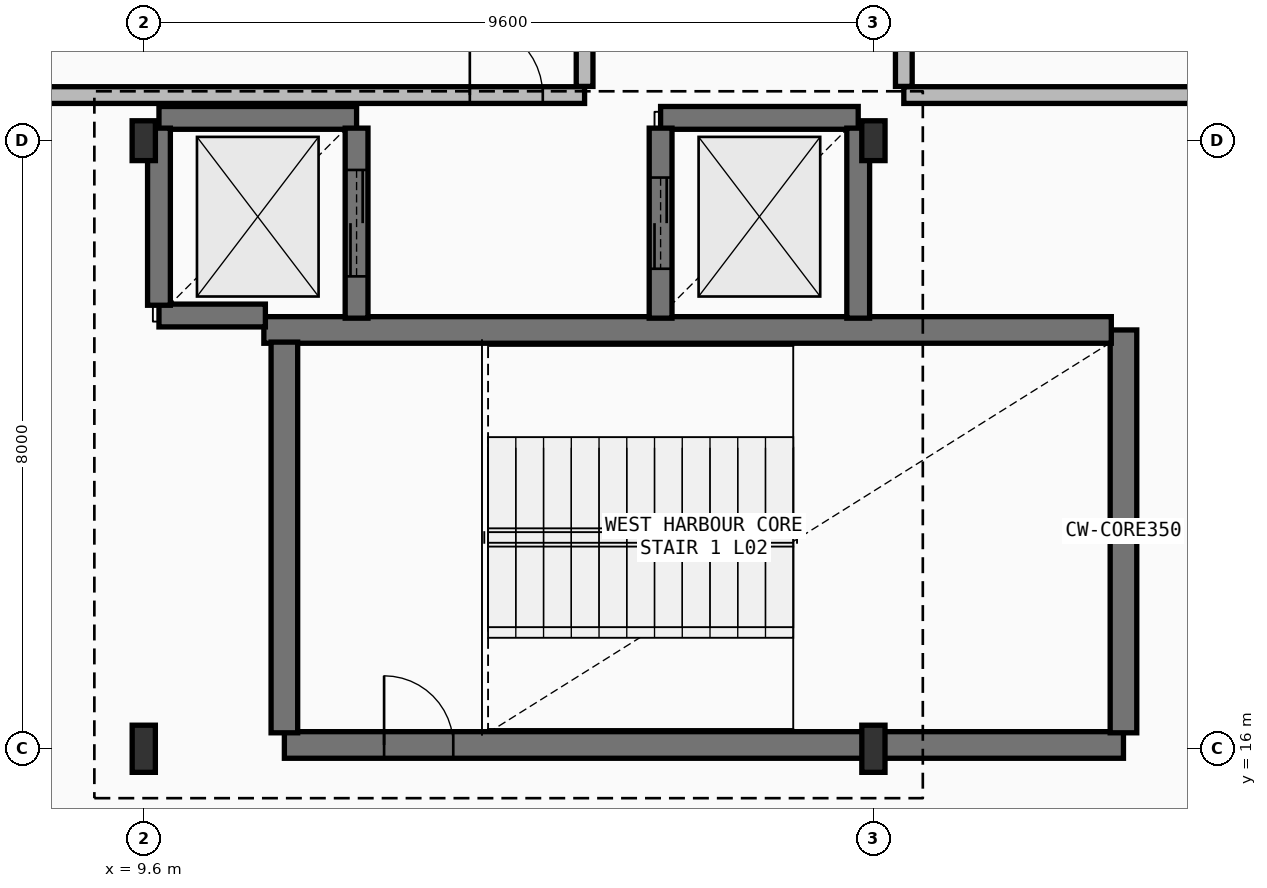
"""IFC4 building model, lengths in metres.
Left out: names, types, materials, properties, quantities, classifications, styles, units other than length and angle.
Written with IfcOpenShell. Run it as: python <this file> out.ifc"""

import sys

from ifc_helpers import new_model, si_unit, direction, frame, frame_2d, origin, origin_2d, place, context, subcontext, project, spatial, rectangle, i_section, extrude, element, fill, save


model = new_model("IFC4")
c1 = context("Model", 3, precision=1e-05, world=origin(), true_north=direction((0.0, 1.0)))
c2 = subcontext(c1, "Body", "Model", "MODEL_VIEW")
j1 = project(units=[si_unit("LENGTHUNIT", "METRE"), si_unit("PLANEANGLEUNIT", "RADIAN")], contexts=[c1])
p1 = place(None, origin())
s1 = spatial("IfcSite", under=j1, at=p1, CompositionType="ELEMENT")
p2 = place(p1, origin())
s2 = spatial("IfcBuilding", under=s1, at=p2, CompositionType="ELEMENT")
p3 = place(p2, frame((0.0, 0.0, 11.4)))
s3 = spatial("IfcBuildingStorey", under=s2, at=p3, CompositionType="ELEMENT", Elevation=11.4)
p4 = place(p3, frame((9.6, 16.0, 0.0), z_axis=(0.0, 0.0, 1.0), x_axis=(1.0, 0.0, 0.0)))
e1 = element("IfcColumn", 1, at=p4, inside=s3, PredefinedType="COLUMN", context=c2, shape_type="SweptSolid", body=[
    extrude(i_section(OverallWidth=0.305, OverallDepth=0.62, WebThickness=0.021, FlangeThickness=0.04, FilletRadius=0.027, at=origin_2d()), origin(), (0.0, 0.0, 1.0), 4.5),
])
p5 = place(p3, frame((9.6, 24.0, 0.0), z_axis=(0.0, 0.0, 1.0), x_axis=(1.0, 0.0, 0.0)))
e2 = element("IfcColumn", 2, at=p5, inside=s3, PredefinedType="COLUMN", context=c2, shape_type="SweptSolid", body=[
    extrude(i_section(OverallWidth=0.306, OverallDepth=0.524, WebThickness=0.021, FlangeThickness=0.04, FilletRadius=0.027, at=origin_2d()), origin(), (0.0, 0.0, 1.0), 4.5),
])
p6 = place(p3, frame((19.2, 16.0, 0.0), z_axis=(0.0, 0.0, 1.0), x_axis=(1.0, 0.0, 0.0)))
e3 = element("IfcColumn", 3, at=p6, inside=s3, PredefinedType="COLUMN", context=c2, shape_type="SweptSolid", body=[
    extrude(i_section(OverallWidth=0.305, OverallDepth=0.62, WebThickness=0.021, FlangeThickness=0.04, FilletRadius=0.027, at=origin_2d()), origin(), (0.0, 0.0, 1.0), 4.5),
])
p7 = place(p3, frame((19.2, 24.0, 0.0), z_axis=(0.0, 0.0, 1.0), x_axis=(1.0, 0.0, 0.0)))
e4 = element("IfcColumn", 4, at=p7, inside=s3, PredefinedType="COLUMN", context=c2, shape_type="SweptSolid", body=[
    extrude(i_section(OverallWidth=0.306, OverallDepth=0.524, WebThickness=0.021, FlangeThickness=0.04, FilletRadius=0.027, at=origin_2d()), origin(), (0.0, 0.0, 1.0), 4.5),
])
p8 = place(p3, frame((11.45, 16.05, 0.0), z_axis=(0.0, 0.0, 1.0), x_axis=(1.0, 0.0, 0.0)))
e5 = element("IfcWall", 5, at=p8, inside=s3, PredefinedType="SHEAR", context=c2, shape_type="SweptSolid", body=[
    extrude(rectangle(XDim=11.04, YDim=0.35, at=frame_2d((5.52, 0.0))), origin(), (0.0, 0.0, 1.0), 4.27),
])
p9 = place(p8, frame((1.312, 0.0, 0.0)))
e6 = element("IfcOpeningElement", 6, at=p9, cuts=e5, PredefinedType="OPENING", context=c2, shape_type="SweptSolid", body=[
    extrude(rectangle(XDim=0.91, YDim=2.08, at=frame_2d((0.455, 1.04))), frame((0.0, 0.185, 0.0), z_axis=(0.0, -1.0, 0.0), x_axis=(1.0, 0.0, 0.0)), (0.0, 0.0, 1.0), 0.37),
])
p10 = place(p3, frame((22.49, 16.21, 0.0), z_axis=(0.0, 0.0, 1.0), x_axis=(0.0, 1.0, 0.0)))
e7 = element("IfcWall", 7, at=p10, inside=s3, PredefinedType="SHEAR", context=c2, shape_type="SweptSolid", body=[
    extrude(rectangle(XDim=5.3, YDim=0.35, at=frame_2d((2.65, 0.0))), origin(), (0.0, 0.0, 1.0), 4.27),
])
p11 = place(p3, frame((22.33, 21.51, 0.0), z_axis=(0.0, 0.0, 1.0), x_axis=(-1.0, 0.0, 0.0)))
e8 = element("IfcWall", 8, at=p11, inside=s3, PredefinedType="SHEAR", context=c2, shape_type="SweptSolid", body=[
    extrude(rectangle(XDim=11.15, YDim=0.35, at=frame_2d((5.575, 0.0))), origin(), (0.0, 0.0, 1.0), 4.27),
])
p12 = place(p3, frame((11.45, 21.35, 0.0), z_axis=(0.0, 0.0, 1.0), x_axis=(0.0, -1.0, 0.0)))
e9 = element("IfcWall", 9, at=p12, inside=s3, PredefinedType="SHEAR", context=c2, shape_type="SweptSolid", body=[
    extrude(rectangle(XDim=5.14, YDim=0.35, at=frame_2d((2.57, 0.0))), origin(), (0.0, 0.0, 1.0), 4.27),
])
p13 = place(p3, frame((12.4, 24.3, 0.0), z_axis=(0.0, 0.0, 1.0), x_axis=(-1.0, 0.0, 0.0)))
e10 = element("IfcWall", 10, at=p13, inside=s3, PredefinedType="SHEAR", context=c2, shape_type="SweptSolid", body=[
    extrude(rectangle(XDim=2.6, YDim=0.3, at=frame_2d((1.3, 0.0))), origin(), (0.0, 0.0, 1.0), 4.27),
])
p14 = place(p3, frame((9.8, 21.7, 0.0), z_axis=(0.0, 0.0, 1.0), x_axis=(1.0, 0.0, 0.0)))
e11 = element("IfcWall", 11, at=p14, inside=s3, PredefinedType="SHEAR", context=c2, shape_type="SweptSolid", body=[
    extrude(rectangle(XDim=1.4, YDim=0.3, at=frame_2d((0.7, 0.0))), origin(), (0.0, 0.0, 1.0), 4.27),
])
p15 = place(p3, frame((12.4, 21.665, 0.0), z_axis=(0.0, 0.0, 1.0), x_axis=(0.0, 1.0, 0.0)))
e12 = element("IfcWall", 12, at=p15, inside=s3, PredefinedType="SHEAR", context=c2, shape_type="SweptSolid", body=[
    extrude(rectangle(XDim=2.5, YDim=0.3, at=frame_2d((1.25, 0.0))), origin(), (0.0, 0.0, 1.0), 4.27),
])
p16 = place(p15, frame((0.55, 0.0, 0.0)))
e13 = element("IfcOpeningElement", 13, at=p16, cuts=e12, PredefinedType="OPENING", context=c2, shape_type="SweptSolid", body=[
    extrude(rectangle(XDim=1.4, YDim=2.26, at=frame_2d((0.7, 1.13))), frame((0.0, 0.16, 0.0), z_axis=(0.0, -1.0, 0.0), x_axis=(1.0, 0.0, 0.0)), (0.0, 0.0, 1.0), 0.32),
])
p17 = place(p3, frame((9.8, 24.165, 0.0), z_axis=(0.0, 0.0, 1.0), x_axis=(0.0, -1.0, 0.0)))
e14 = element("IfcWall", 14, at=p17, inside=s3, PredefinedType="SHEAR", context=c2, shape_type="SweptSolid", body=[
    extrude(rectangle(XDim=2.33, YDim=0.3, at=frame_2d((1.165, 0.0))), origin(), (0.0, 0.0, 1.0), 4.27),
])
p18 = place(p3, frame((19.0, 24.3, 0.0), z_axis=(0.0, 0.0, 1.0), x_axis=(-1.0, 0.0, 0.0)))
e15 = element("IfcWall", 15, at=p18, inside=s3, PredefinedType="SHEAR", context=c2, shape_type="SweptSolid", body=[
    extrude(rectangle(XDim=2.6, YDim=0.3, at=frame_2d((1.3, 0.0))), origin(), (0.0, 0.0, 1.0), 4.27),
])
p19 = place(p3, frame((19.0, 21.665, 0.0), z_axis=(0.0, 0.0, 1.0), x_axis=(0.0, 1.0, 0.0)))
e16 = element("IfcWall", 16, at=p19, inside=s3, PredefinedType="SHEAR", context=c2, shape_type="SweptSolid", body=[
    extrude(rectangle(XDim=2.5, YDim=0.3, at=frame_2d((1.25, 0.0))), origin(), (0.0, 0.0, 1.0), 4.27),
])
p20 = place(p3, frame((16.4, 24.165, 0.0), z_axis=(0.0, 0.0, 1.0), x_axis=(0.0, -1.0, 0.0)))
e17 = element("IfcWall", 17, at=p20, inside=s3, PredefinedType="SHEAR", context=c2, shape_type="SweptSolid", body=[
    extrude(rectangle(XDim=2.5, YDim=0.3, at=frame_2d((1.25, 0.0))), origin(), (0.0, 0.0, 1.0), 4.27),
])
p21 = place(p20, frame((0.65, 0.0, 0.0)))
e18 = element("IfcOpeningElement", 18, at=p21, cuts=e17, PredefinedType="OPENING", context=c2, shape_type="SweptSolid", body=[
    extrude(rectangle(XDim=1.2, YDim=2.2, at=frame_2d((0.6, 1.1))), frame((0.0, 0.16, 0.0), z_axis=(0.0, -1.0, 0.0), x_axis=(1.0, 0.0, 0.0)), (0.0, 0.0, 1.0), 0.32),
])
p22 = place(p3, frame((0.6, 24.6, 0.0), z_axis=(0.0, 0.0, 1.0), x_axis=(1.0, 0.0, 0.0)))
e19 = element("IfcWall", 19, at=p22, inside=s3, PredefinedType="PARTITIONING", context=c2, shape_type="SweptSolid", body=[
    extrude(rectangle(XDim=14.8, YDim=0.22, at=frame_2d((7.4, 0.0))), origin(), (0.0, 0.0, 1.0), 3.64),
])
p23 = place(p22, frame((5.176, 0.0, 0.0)))
e20 = element("IfcOpeningElement", 20, at=p23, cuts=e19, PredefinedType="OPENING", context=c2, shape_type="SweptSolid", body=[
    extrude(rectangle(XDim=1.86, YDim=2.32, at=frame_2d((0.93, 1.16))), frame((0.0, 0.12, 0.0), z_axis=(0.0, -1.0, 0.0), x_axis=(1.0, 0.0, 0.0)), (0.0, 0.0, 1.0), 0.24),
])
p24 = place(p22, frame((13.29, 0.0, 0.0)))
e21 = element("IfcOpeningElement", 21, at=p24, cuts=e19, PredefinedType="OPENING", context=c2, shape_type="SweptSolid", body=[
    extrude(rectangle(XDim=0.96, YDim=2.45, at=frame_2d((0.48, 1.225))), frame((0.0, 0.12, 0.0), z_axis=(0.0, -1.0, 0.0), x_axis=(1.0, 0.0, 0.0)), (0.0, 0.0, 1.0), 0.24),
])
p25 = place(p3, frame((15.4, 24.714, 0.0), z_axis=(0.0, 0.0, 1.0), x_axis=(0.0, 1.0, 0.0)))
e22 = element("IfcWall", 22, at=p25, inside=s3, PredefinedType="PARTITIONING", context=c2, shape_type="SweptSolid", body=[
    extrude(rectangle(XDim=14.686, YDim=0.22, at=frame_2d((7.343, 0.0))), origin(), (0.0, 0.0, 1.0), 3.64),
])
p26 = place(p3, frame((19.6, 24.6, 0.0), z_axis=(0.0, 0.0, 1.0), x_axis=(1.0, 0.0, 0.0)))
e23 = element("IfcWall", 23, at=p26, inside=s3, PredefinedType="PARTITIONING", context=c2, shape_type="SweptSolid", body=[
    extrude(rectangle(XDim=28.0, YDim=0.22, at=frame_2d((14.0, 0.0))), origin(), (0.0, 0.0, 1.0), 3.64),
])
p27 = place(p26, frame((11.718, 0.0, 0.0)))
e24 = element("IfcOpeningElement", 24, at=p27, cuts=e23, PredefinedType="OPENING", context=c2, shape_type="SweptSolid", body=[
    extrude(rectangle(XDim=1.96, YDim=2.36, at=frame_2d((0.98, 1.18))), frame((0.0, 0.12, 0.0), z_axis=(0.0, -1.0, 0.0), x_axis=(1.0, 0.0, 0.0)), (0.0, 0.0, 1.0), 0.24),
])
p28 = place(p26, frame((21.068, 0.0, 0.0)))
e25 = element("IfcOpeningElement", 25, at=p28, cuts=e23, PredefinedType="OPENING", context=c2, shape_type="SweptSolid", body=[
    extrude(rectangle(XDim=0.99, YDim=2.28, at=frame_2d((0.495, 1.14))), frame((0.0, 0.12, 0.0), z_axis=(0.0, -1.0, 0.0), x_axis=(1.0, 0.0, 0.0)), (0.0, 0.0, 1.0), 0.24),
])
p29 = place(p3, frame((19.6, 39.286, 0.0), z_axis=(0.0, 0.0, 1.0), x_axis=(0.0, -1.0, 0.0)))
e26 = element("IfcWall", 26, at=p29, inside=s3, PredefinedType="PARTITIONING", context=c2, shape_type="SweptSolid", body=[
    extrude(rectangle(XDim=14.572, YDim=0.22, at=frame_2d((7.286, 0.0))), origin(), (0.0, 0.0, 1.0), 3.69),
])
p30 = place(p9, origin())
e27 = element("IfcDoor", 27, at=p30, inside=s3, OperationType="SINGLE_SWING_RIGHT", PredefinedType="DOOR", context=c2, shape_type="SweptSolid", body=[
    extrude(rectangle(XDim=0.91, YDim=2.08, at=frame_2d((0.455, 1.04))), frame((0.0, 0.025, 0.0), z_axis=(0.0, -1.0, 0.0), x_axis=(1.0, 0.0, 0.0)), (0.0, 0.0, 1.0), 0.05),
])
fill(e6, e27)
p31 = place(p16, origin())
e28 = element("IfcDoor", 28, at=p31, inside=s3, OperationType="DOUBLE_DOOR_SLIDING", PredefinedType="DOOR", context=c2, shape_type="SweptSolid", body=[
    extrude(rectangle(XDim=1.4, YDim=2.26, at=frame_2d((0.7, 1.13))), frame((0.0, 0.025, 0.0), z_axis=(0.0, -1.0, 0.0), x_axis=(1.0, 0.0, 0.0)), (0.0, 0.0, 1.0), 0.05),
])
fill(e13, e28)
p32 = place(p21, origin())
e29 = element("IfcDoor", 29, at=p32, inside=s3, OperationType="DOUBLE_DOOR_SLIDING", PredefinedType="DOOR", context=c2, shape_type="SweptSolid", body=[
    extrude(rectangle(XDim=1.2, YDim=2.2, at=frame_2d((0.6, 1.1))), frame((0.0, 0.025, 0.0), z_axis=(0.0, -1.0, 0.0), x_axis=(1.0, 0.0, 0.0)), (0.0, 0.0, 1.0), 0.05),
])
fill(e18, e29)
p33 = place(p24, origin())
e30 = element("IfcDoor", 30, at=p33, inside=s3, OperationType="SINGLE_SWING_RIGHT", PredefinedType="DOOR", context=c2, shape_type="SweptSolid", body=[
    extrude(rectangle(XDim=0.96, YDim=2.45, at=frame_2d((0.48, 1.225))), frame((0.0, 0.025, 0.0), z_axis=(0.0, -1.0, 0.0), x_axis=(1.0, 0.0, 0.0)), (0.0, 0.0, 1.0), 0.05),
])
fill(e21, e30)
save(model, sys.argv[1])
